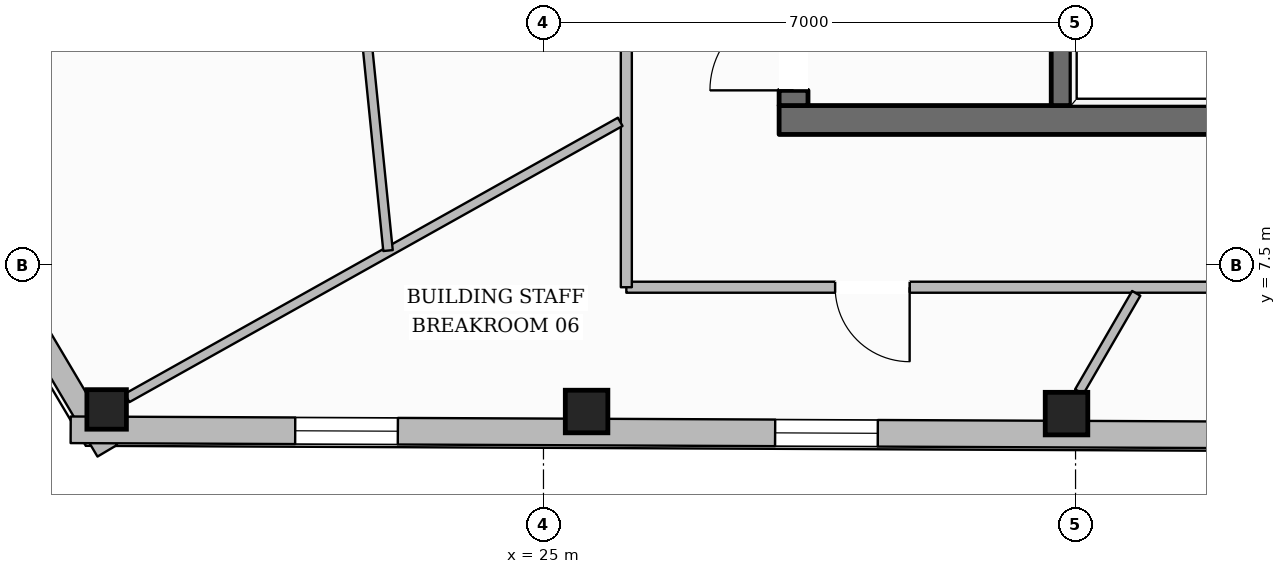
"""IFC4 building model, lengths in metres.
Left out: names, types, materials, properties, quantities, classifications, styles, units other than length and angle.
Written with IfcOpenShell. Run it as: python <this file> out.ifc"""

import sys

from ifc_helpers import new_model, si_unit, direction, frame, frame_2d, origin, origin_2d, place, context, subcontext, project, spatial, rectangle, hollow_rectangle, extrude, element, fill, save


model = new_model("IFC4")
c1 = context("Model", 3, precision=1e-05, world=origin(), true_north=direction((0.0, 1.0)))
c2 = subcontext(c1, "Body", "Model", "MODEL_VIEW")
j1 = project(units=[si_unit("LENGTHUNIT", "METRE"), si_unit("PLANEANGLEUNIT", "RADIAN")], contexts=[c1])
p1 = place(None, origin())
s1 = spatial("IfcSite", under=j1, at=p1, CompositionType="ELEMENT")
p2 = place(p1, origin())
s2 = spatial("IfcBuilding", under=s1, at=p2, CompositionType="ELEMENT")
p3 = place(p2, frame((0.0, 0.0, 270.3)))
s3 = spatial("IfcBuildingStorey", under=s2, at=p3, CompositionType="ELEMENT", Elevation=270.3)
p4 = place(p3, frame((28.1, 9.41, 0.0), z_axis=(0.0, 0.0, 1.0), x_axis=(1.0, 0.0, 0.0)))
e1 = element("IfcWall", 1, at=p4, inside=s3, PredefinedType="SOLIDWALL", context=c2, shape_type="SweptSolid", body=[
    extrude(rectangle(XDim=19.8, YDim=0.38, at=frame_2d((9.9, 0.0))), origin(), (0.0, 0.0, 1.0), 3.61),
])
p5 = place(p4, frame((10.4, 0.0, 0.0)))
e2 = element("IfcOpeningElement", 2, at=p5, cuts=e1, PredefinedType="OPENING", context=c2, shape_type="SweptSolid", body=[
    extrude(rectangle(XDim=1.4, YDim=2.2, at=frame_2d((0.7, 1.1))), frame((0.0, 0.2, 0.0), z_axis=(0.0, -1.0, 0.0), x_axis=(1.0, 0.0, 0.0)), (0.0, 0.0, 1.0), 0.4),
])
p6 = place(p3, frame((28.29, 9.6, 0.0), z_axis=(0.0, 0.0, 1.0), x_axis=(0.0, 1.0, 0.0)))
e3 = element("IfcWall", 3, at=p6, inside=s3, PredefinedType="SOLIDWALL", context=c2, shape_type="SweptSolid", body=[
    extrude(rectangle(XDim=13.0, YDim=0.38, at=frame_2d((6.5, 0.0))), origin(), (0.0, 0.0, 1.0), 3.61),
])
p7 = place(p6, frame((0.2, 0.0, 0.0)))
e4 = element("IfcOpeningElement", 4, at=p7, cuts=e3, PredefinedType="OPENING", context=c2, shape_type="SweptSolid", body=[
    extrude(rectangle(XDim=1.1, YDim=2.15, at=frame_2d((0.55, 1.075))), frame((0.0, 0.2, 0.0), z_axis=(0.0, -1.0, 0.0), x_axis=(1.0, 0.0, 0.0)), (0.0, 0.0, 1.0), 0.4),
])
p8 = place(p6, frame((8.4, 0.0, 0.0)))
e5 = element("IfcOpeningElement", 5, at=p8, cuts=e3, PredefinedType="OPENING", context=c2, shape_type="SweptSolid", body=[
    extrude(rectangle(XDim=0.9, YDim=2.1, at=frame_2d((0.45, 1.05))), frame((0.0, 0.2, 0.0), z_axis=(0.0, -1.0, 0.0), x_axis=(1.0, 0.0, 0.0)), (0.0, 0.0, 1.0), 0.4),
])
p9 = place(p3, frame((31.81, 9.6, 0.0), z_axis=(0.0, 0.0, 1.0), x_axis=(0.0, 1.0, 0.0)))
e6 = element("IfcWall", 6, at=p9, inside=s3, PredefinedType="SHEAR", context=c2, shape_type="SweptSolid", body=[
    extrude(rectangle(XDim=13.0, YDim=0.26, at=frame_2d((6.5, 0.0))), origin(), (0.0, 0.0, 1.0), 3.61),
])
p10 = place(p9, frame((10.925, 0.0, 0.0)))
e7 = element("IfcOpeningElement", 7, at=p10, cuts=e6, PredefinedType="OPENING", context=c2, shape_type="SweptSolid", body=[
    extrude(rectangle(XDim=1.25, YDim=2.25, at=frame_2d((0.625, 1.125))), frame((0.0, 0.14, 0.0), z_axis=(0.0, -1.0, 0.0), x_axis=(1.0, 0.0, 0.0)), (0.0, 0.0, 1.0), 0.28),
])
p11 = place(p3, frame((19.253, 5.602, 0.0), z_axis=(0.0, 0.0, 1.0), x_axis=(1.0, 0.0, 0.0)))
e8 = element("IfcColumn", 8, at=p11, inside=s3, PredefinedType="COLUMN", context=c2, shape_type="SweptSolid", body=[
    extrude(hollow_rectangle(XDim=0.52, YDim=0.52, WallThickness=0.024, at=origin_2d()), origin(), (0.0, 0.0, 1.0), 3.61),
])
for number, where, z_axis, x_axis in (
    (9, (25.567, 5.575, 0.0), (0.0, 0.0, 1.0), (1.0, 0.0, 0.0)),
    (10, (31.881, 5.547, 0.0), (0.0, 0.0, 1.0), (1.0, 0.0, 0.0)),
):
    element("IfcColumn", number, at=place(p3, frame(where, z_axis=z_axis, x_axis=x_axis)), inside=s3, PredefinedType="COLUMN", context=c2, shape_type="SweptSolid", body=[
        extrude(hollow_rectangle(XDim=0.56, YDim=0.56, WallThickness=0.025, at=origin_2d()), origin(), (0.0, 0.0, 1.0), 3.61),
    ])
p12 = place(p3, frame((19.261, 5.059, 0.0), z_axis=(0.0, 0.0, 1.0), x_axis=(-0.509846271697, 0.860265528332, 0.0)))
e11 = element("IfcWall", 11, at=p12, inside=s3, PredefinedType="STANDARD", context=c2, shape_type="SweptSolid", body=[
    extrude(rectangle(XDim=7.015, YDim=0.3, at=frame_2d((3.508, 0.0))), origin(), (0.0, 0.0, 1.0), 3.196),
])
p13 = place(p12, frame((2.983, 0.0, 0.65)))
e12 = element("IfcOpeningElement", 12, at=p13, cuts=e11, PredefinedType="OPENING", context=c2, shape_type="SweptSolid", body=[
    extrude(rectangle(XDim=1.05, YDim=1.7, at=frame_2d((0.525, 0.85))), frame((0.0, 0.16, 0.0), z_axis=(0.0, -1.0, 0.0), x_axis=(1.0, 0.0, 0.0)), (0.0, 0.0, 1.0), 0.32),
])
p14 = place(p3, frame((57.613, 5.165, 0.0), z_axis=(0.0, 0.0, 1.0), x_axis=(-0.99999050908, 0.004356805123, 0.0)))
e13 = element("IfcWall", 13, at=p14, inside=s3, PredefinedType="STANDARD", context=c2, shape_type="SweptSolid", body=[
    extrude(rectangle(XDim=38.833, YDim=0.35, at=frame_2d((19.417, 0.0))), origin(), (0.0, 0.0, 1.0), 3.196),
])
p15 = place(p14, frame((34.529, 0.0, 0.65)))
e14 = element("IfcOpeningElement", 14, at=p15, cuts=e13, PredefinedType="OPENING", context=c2, shape_type="SweptSolid", body=[
    extrude(rectangle(XDim=1.35, YDim=1.75, at=frame_2d((0.675, 0.875))), frame((0.0, 0.185, 0.0), z_axis=(0.0, -1.0, 0.0), x_axis=(1.0, 0.0, 0.0)), (0.0, 0.0, 1.0), 0.37),
])
p16 = place(p14, frame((28.215, 0.0, 0.65)))
e15 = element("IfcOpeningElement", 15, at=p16, cuts=e13, PredefinedType="OPENING", context=c2, shape_type="SweptSolid", body=[
    extrude(rectangle(XDim=1.35, YDim=1.75, at=frame_2d((0.675, 0.875))), frame((0.0, 0.185, 0.0), z_axis=(0.0, -1.0, 0.0), x_axis=(1.0, 0.0, 0.0)), (0.0, 0.0, 1.0), 0.37),
])
p17 = place(p14, frame((21.901, 0.0, 0.65)))
e16 = element("IfcOpeningElement", 16, at=p17, cuts=e13, PredefinedType="OPENING", context=c2, shape_type="SweptSolid", body=[
    extrude(rectangle(XDim=1.35, YDim=1.75, at=frame_2d((0.675, 0.875))), frame((0.0, 0.185, 0.0), z_axis=(0.0, -1.0, 0.0), x_axis=(1.0, 0.0, 0.0)), (0.0, 0.0, 1.0), 0.37),
])
p18 = place(p14, frame((9.272, 0.0, 0.65)))
e17 = element("IfcOpeningElement", 17, at=p18, cuts=e13, PredefinedType="OPENING", context=c2, shape_type="SweptSolid", body=[
    extrude(rectangle(XDim=1.35, YDim=1.75, at=frame_2d((0.675, 0.875))), frame((0.0, 0.185, 0.0), z_axis=(0.0, -1.0, 0.0), x_axis=(1.0, 0.0, 0.0)), (0.0, 0.0, 1.0), 0.37),
])
p19 = place(p14, frame((2.958, 0.0, 0.65)))
e18 = element("IfcOpeningElement", 18, at=p19, cuts=e13, PredefinedType="OPENING", context=c2, shape_type="SweptSolid", body=[
    extrude(rectangle(XDim=1.35, YDim=1.75, at=frame_2d((0.675, 0.875))), frame((0.0, 0.185, 0.0), z_axis=(0.0, -1.0, 0.0), x_axis=(1.0, 0.0, 0.0)), (0.0, 0.0, 1.0), 0.37),
])
p20 = place(p3, frame((49.91, 7.21, 0.0), z_axis=(0.0, 0.0, 1.0), x_axis=(-1.0, 0.0, 0.0)))
e19 = element("IfcWall", 19, at=p20, inside=s3, PredefinedType="PARTITIONING", context=c2, shape_type="SweptSolid", body=[
    extrude(rectangle(XDim=23.82, YDim=0.145, at=frame_2d((11.91, 0.0))), origin(), (0.0, 0.0, 1.0), 3.61),
])
p21 = place(p20, frame((20.093, 0.0, 0.0)))
e20 = element("IfcOpeningElement", 20, at=p21, cuts=e19, PredefinedType="OPENING", context=c2, shape_type="SweptSolid", body=[
    extrude(rectangle(XDim=0.98, YDim=2.15, at=frame_2d((0.49, 1.075))), frame((0.0, 0.083, 0.0), z_axis=(0.0, -1.0, 0.0), x_axis=(1.0, 0.0, 0.0)), (0.0, 0.0, 1.0), 0.165),
])
p22 = place(p20, frame((11.091, 0.0, 0.0)))
e21 = element("IfcOpeningElement", 21, at=p22, cuts=e19, PredefinedType="OPENING", context=c2, shape_type="SweptSolid", body=[
    extrude(rectangle(XDim=1.02, YDim=2.15, at=frame_2d((0.51, 1.075))), frame((0.0, 0.083, 0.0), z_axis=(0.0, -1.0, 0.0), x_axis=(1.0, 0.0, 0.0)), (0.0, 0.0, 1.0), 0.165),
])
p23 = place(p20, frame((2.361, 0.0, 0.0)))
e22 = element("IfcOpeningElement", 22, at=p23, cuts=e19, PredefinedType="OPENING", context=c2, shape_type="SweptSolid", body=[
    extrude(rectangle(XDim=0.98, YDim=2.15, at=frame_2d((0.49, 1.075))), frame((0.0, 0.083, 0.0), z_axis=(0.0, -1.0, 0.0), x_axis=(1.0, 0.0, 0.0)), (0.0, 0.0, 1.0), 0.165),
])
p24 = place(p3, frame((26.09, 7.21, 0.0), z_axis=(0.0, 0.0, 1.0), x_axis=(0.0, 1.0, 0.0)))
e23 = element("IfcWall", 23, at=p24, inside=s3, PredefinedType="PARTITIONING", context=c2, shape_type="SweptSolid", body=[
    extrude(rectangle(XDim=17.78, YDim=0.145, at=frame_2d((8.89, 0.0))), origin(), (0.0, 0.0, 1.0), 3.349),
])
p25 = place(p24, frame((9.416, 0.0, 0.0)))
e24 = element("IfcOpeningElement", 24, at=p25, cuts=e23, PredefinedType="OPENING", context=c2, shape_type="SweptSolid", body=[
    extrude(rectangle(XDim=0.98, YDim=2.15, at=frame_2d((0.49, 1.075))), frame((0.0, 0.083, 0.0), z_axis=(0.0, -1.0, 0.0), x_axis=(1.0, 0.0, 0.0)), (0.0, 0.0, 1.0), 0.165),
])
p26 = place(p3, frame((26.01, 9.386, 0.0), z_axis=(0.0, 0.0, 1.0), x_axis=(-0.872521690704, -0.488575377246, 0.0)))
e25 = element("IfcWall", 25, at=p26, inside=s3, PredefinedType="PARTITIONING", context=c2, shape_type="SweptSolid", body=[
    extrude(rectangle(XDim=7.437, YDim=0.125, at=frame_2d((3.718, 0.0))), origin(), (0.0, 0.0, 1.0), 3.246),
])
p27 = place(p3, frame((32.799, 7.129, 0.0), z_axis=(0.0, 0.0, 1.0), x_axis=(-0.501718089772, -0.865031189262, 0.0)))
e26 = element("IfcWall", 26, at=p27, inside=s3, PredefinedType="PARTITIONING", context=c2, shape_type="SweptSolid", body=[
    extrude(rectangle(XDim=1.496, YDim=0.125, at=frame_2d((0.748, 0.0))), origin(), (0.0, 0.0, 1.0), 3.61),
])
p28 = place(p3, frame((21.669, 20.435, 0.0), z_axis=(0.0, 0.0, 1.0), x_axis=(0.100422843379, -0.994944848988, 0.0)))
e27 = element("IfcWall", 27, at=p28, inside=s3, PredefinedType="PARTITIONING", context=c2, shape_type="SweptSolid", body=[
    extrude(rectangle(XDim=12.807, YDim=0.125, at=frame_2d((6.404, 0.0))), origin(), (0.0, 0.0, 1.0), 3.349),
])
p29 = place(p28, frame((5.8, 0.0, 0.0)))
e28 = element("IfcOpeningElement", 28, at=p29, cuts=e27, PredefinedType="OPENING", context=c2, shape_type="SweptSolid", body=[
    extrude(rectangle(XDim=0.98, YDim=2.15, at=frame_2d((0.49, 1.075))), frame((0.0, 0.073, 0.0), z_axis=(0.0, -1.0, 0.0), x_axis=(1.0, 0.0, 0.0)), (0.0, 0.0, 1.0), 0.145),
])
p30 = place(p15, origin())
e29 = element("IfcWindow", 29, at=p30, inside=s3, PartitioningType="SINGLE_PANEL", PredefinedType="WINDOW", context=c2, shape_type="SweptSolid", body=[
    extrude(rectangle(XDim=1.35, YDim=1.75, at=frame_2d((0.675, 0.875))), frame((0.0, 0.03, 0.0), z_axis=(0.0, -1.0, 0.0), x_axis=(1.0, 0.0, 0.0)), (0.0, 0.0, 1.0), 0.06),
])
fill(e14, e29)
p31 = place(p16, origin())
e30 = element("IfcWindow", 30, at=p31, inside=s3, PartitioningType="SINGLE_PANEL", PredefinedType="WINDOW", context=c2, shape_type="SweptSolid", body=[
    extrude(rectangle(XDim=1.35, YDim=1.75, at=frame_2d((0.675, 0.875))), frame((0.0, 0.03, 0.0), z_axis=(0.0, -1.0, 0.0), x_axis=(1.0, 0.0, 0.0)), (0.0, 0.0, 1.0), 0.06),
])
fill(e15, e30)
p32 = place(p7, origin())
e31 = element("IfcDoor", 31, at=p32, inside=s3, OperationType="SINGLE_SWING_LEFT", PredefinedType="DOOR", context=c2, shape_type="SweptSolid", body=[
    extrude(rectangle(XDim=1.1, YDim=2.15, at=frame_2d((0.55, 1.075))), frame((0.0, 0.025, 0.0), z_axis=(0.0, -1.0, 0.0), x_axis=(1.0, 0.0, 0.0)), (0.0, 0.0, 1.0), 0.05),
])
fill(e4, e31)
p33 = place(p21, origin())
e32 = element("IfcDoor", 32, at=p33, inside=s3, OperationType="SINGLE_SWING_LEFT", PredefinedType="DOOR", context=c2, shape_type="SweptSolid", body=[
    extrude(rectangle(XDim=0.98, YDim=2.15, at=frame_2d((0.49, 1.075))), frame((0.0, 0.025, 0.0), z_axis=(0.0, -1.0, 0.0), x_axis=(1.0, 0.0, 0.0)), (0.0, 0.0, 1.0), 0.05),
])
fill(e20, e32)
save(model, sys.argv[1])
